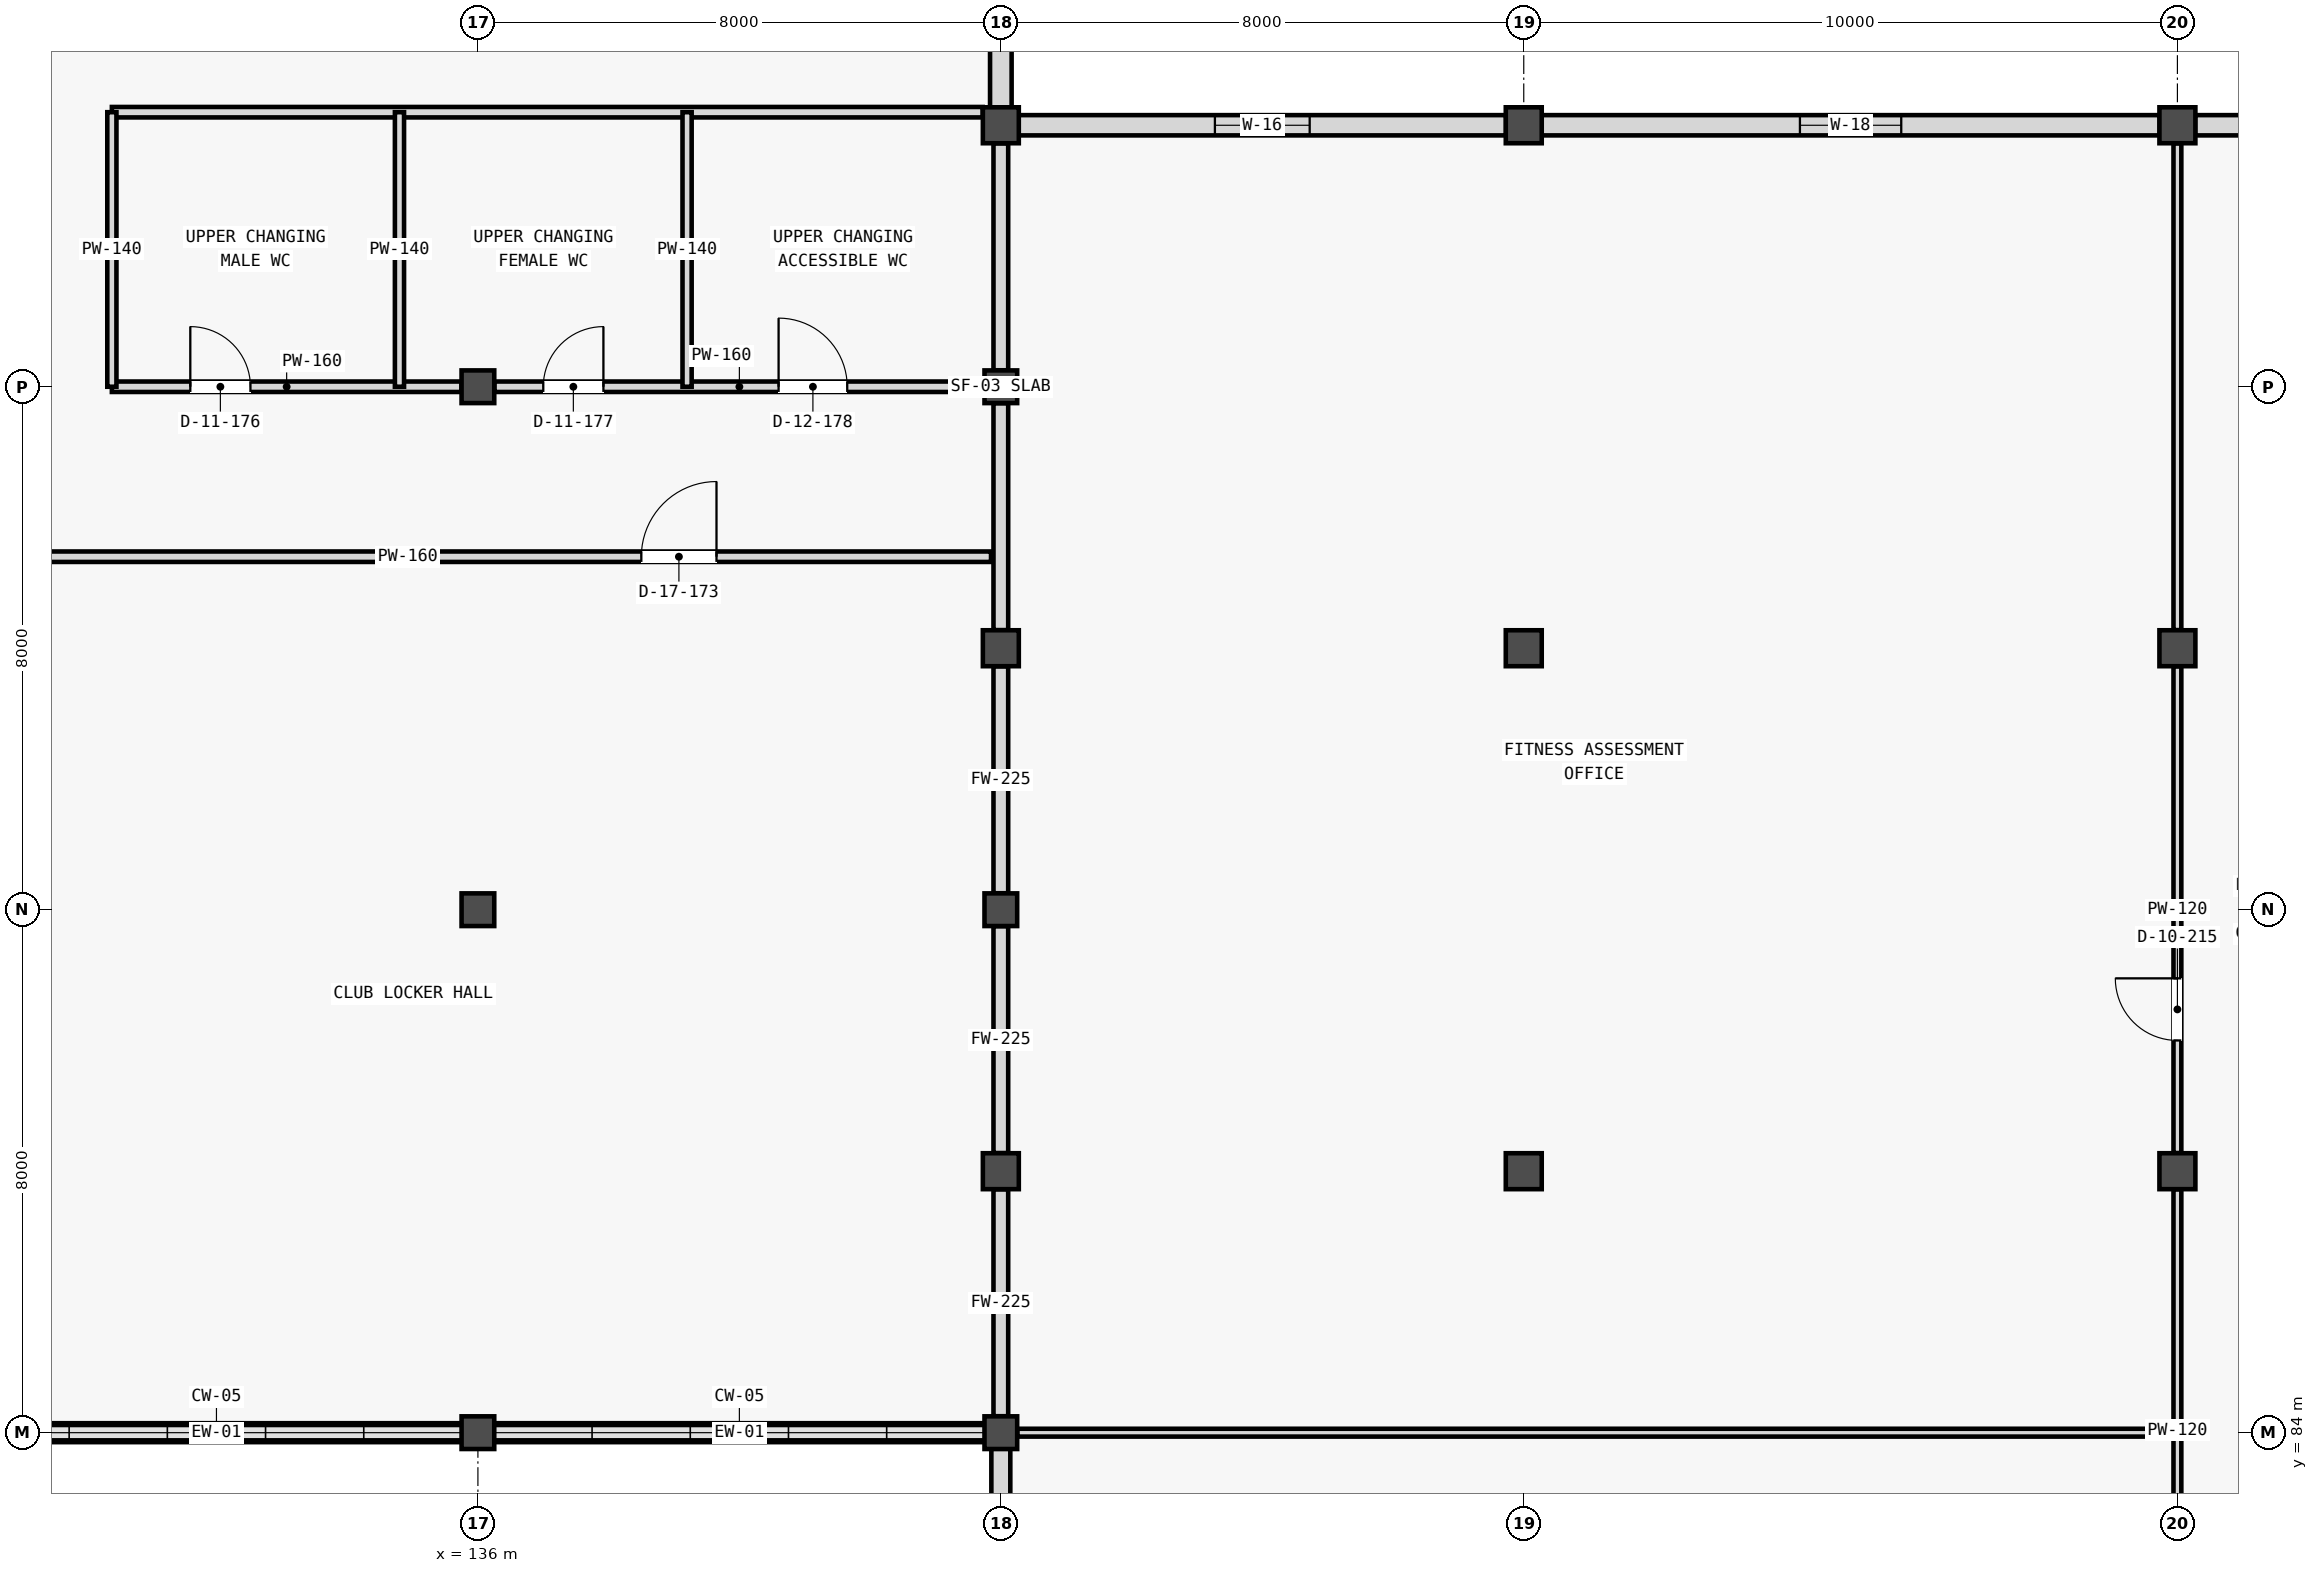
"""IFC4 building model, lengths in metres.
Left out: names, types, materials, properties, quantities, classifications, styles, units other than length and angle.
Written with IfcOpenShell. Run it as: python <this file> out.ifc"""

import sys

from ifc_helpers import new_model, si_unit, direction, frame, frame_2d, origin, origin_2d, place, context, subcontext, project, spatial, rectangle, extrude, element, fill, save


model = new_model("IFC4")
c1 = context("Model", 3, precision=1e-05, world=origin(), true_north=direction((0.0, 1.0)))
c2 = subcontext(c1, "Body", "Model", "MODEL_VIEW")
j1 = project(units=[si_unit("LENGTHUNIT", "METRE"), si_unit("PLANEANGLEUNIT", "RADIAN")], contexts=[c1])
p1 = place(None, origin())
s1 = spatial("IfcSite", under=j1, at=p1, CompositionType="ELEMENT")
p2 = place(p1, origin())
s2 = spatial("IfcBuilding", under=s1, at=p2, CompositionType="ELEMENT")
p3 = place(p2, frame((0.0, 0.0, 5.4)))
s3 = spatial("IfcBuildingStorey", under=s2, at=p3, CompositionType="ELEMENT", Elevation=5.4)
for number, where, z_axis, x_axis in (
    (1, (136.0, 84.0, 0.0), (0.0, 0.0, 1.0), (1.0, 0.0, 0.0)),
    (2, (136.0, 92.0, 0.0), (0.0, 0.0, 1.0), (1.0, 0.0, 0.0)),
    (3, (136.0, 100.0, 0.0), (0.0, 0.0, 1.0), (1.0, 0.0, 0.0)),
    (4, (144.0, 84.0, 0.0), (0.0, 0.0, 1.0), (1.0, 0.0, 0.0)),
    (5, (144.0, 92.0, 0.0), (0.0, 0.0, 1.0), (1.0, 0.0, 0.0)),
    (6, (144.0, 100.0, 0.0), (0.0, 0.0, 1.0), (1.0, 0.0, 0.0)),
):
    element("IfcColumn", number, at=place(p3, frame(where, z_axis=z_axis, x_axis=x_axis)), inside=s3, PredefinedType="COLUMN", context=c2, shape_type="SweptSolid", body=[
        extrude(rectangle(XDim=0.5, YDim=0.5, at=origin_2d()), origin(), (0.0, 0.0, 1.0), 4.57),
    ])
p4 = place(p3, frame((144.0, 88.0, 0.0), z_axis=(0.0, 0.0, 1.0), x_axis=(1.0, 0.0, 0.0)))
e7 = element("IfcColumn", 7, at=p4, inside=s3, PredefinedType="COLUMN", context=c2, shape_type="SweptSolid", body=[
    extrude(rectangle(XDim=0.55, YDim=0.55, at=origin_2d()), origin(), (0.0, 0.0, 1.0), 4.57),
])
for number, where, z_axis, x_axis in (
    (8, (152.0, 88.0, 0.0), (0.0, 0.0, 1.0), (1.0, 0.0, 0.0)),
    (9, (162.0, 88.0, 0.0), (0.0, 0.0, 1.0), (1.0, 0.0, 0.0)),
):
    element("IfcColumn", number, at=place(p3, frame(where, z_axis=z_axis, x_axis=x_axis)), inside=s3, PredefinedType="COLUMN", context=c2, shape_type="SweptSolid", body=[
        extrude(rectangle(XDim=0.55, YDim=0.55, at=origin_2d()), origin(), (0.0, 0.0, 1.0), 4.55),
    ])
p5 = place(p3, frame((144.0, 96.0, 0.0), z_axis=(0.0, 0.0, 1.0), x_axis=(1.0, 0.0, 0.0)))
e10 = element("IfcColumn", 10, at=p5, inside=s3, PredefinedType="COLUMN", context=c2, shape_type="SweptSolid", body=[
    extrude(rectangle(XDim=0.55, YDim=0.55, at=origin_2d()), origin(), (0.0, 0.0, 1.0), 4.57),
])
for number, where, z_axis, x_axis in (
    (11, (152.0, 96.0, 0.0), (0.0, 0.0, 1.0), (1.0, 0.0, 0.0)),
    (12, (162.0, 96.0, 0.0), (0.0, 0.0, 1.0), (1.0, 0.0, 0.0)),
):
    element("IfcColumn", number, at=place(p3, frame(where, z_axis=z_axis, x_axis=x_axis)), inside=s3, PredefinedType="COLUMN", context=c2, shape_type="SweptSolid", body=[
        extrude(rectangle(XDim=0.55, YDim=0.55, at=origin_2d()), origin(), (0.0, 0.0, 1.0), 4.55),
    ])
p6 = place(p3, frame((144.0, 104.0, 0.0), z_axis=(0.0, 0.0, 1.0), x_axis=(1.0, 0.0, 0.0)))
e13 = element("IfcColumn", 13, at=p6, inside=s3, PredefinedType="COLUMN", context=c2, shape_type="SweptSolid", body=[
    extrude(rectangle(XDim=0.55, YDim=0.55, at=origin_2d()), origin(), (0.0, 0.0, 1.0), 4.57),
])
for number, where, z_axis, x_axis in (
    (14, (152.0, 104.0, 0.0), (0.0, 0.0, 1.0), (1.0, 0.0, 0.0)),
    (15, (162.0, 104.0, 0.0), (0.0, 0.0, 1.0), (1.0, 0.0, 0.0)),
):
    element("IfcColumn", number, at=place(p3, frame(where, z_axis=z_axis, x_axis=x_axis)), inside=s3, PredefinedType="COLUMN", context=c2, shape_type="SweptSolid", body=[
        extrude(rectangle(XDim=0.55, YDim=0.55, at=origin_2d()), origin(), (0.0, 0.0, 1.0), 4.59),
    ])
for number, where, z_axis, x_axis in (
    (16, (128.246, 84.0, 0.0), (0.0, 0.0, 1.0), (1.0, 0.0, 0.0)),
    (17, (136.246, 84.0, 0.0), (0.0, 0.0, 1.0), (1.0, 0.0, 0.0)),
):
    element("IfcWall", number, at=place(p3, frame(where, z_axis=z_axis, x_axis=x_axis)), inside=s3, PredefinedType="STANDARD", context=c2, shape_type="SweptSolid", body=[
        extrude(rectangle(XDim=7.508, YDim=0.29, at=frame_2d((3.754, 0.0))), origin(), (0.0, 0.0, 1.0), 1.4),
    ])
p7 = place(p3, frame((144.0, 104.271, 0.0), z_axis=(0.0, 0.0, 1.0), x_axis=(0.0, 1.0, 0.0)))
e18 = element("IfcWall", 18, at=p7, inside=s3, PredefinedType="STANDARD", context=c2, shape_type="SweptSolid", body=[
    extrude(rectangle(XDim=3.483, YDim=0.33, at=frame_2d((1.741, 0.0))), origin(), (0.0, 0.0, 1.0), 3.85),
])
p8 = place(p3, frame((144.0, 80.271, 0.0), z_axis=(0.0, 0.0, 1.0), x_axis=(0.0, 1.0, 0.0)))
e19 = element("IfcWall", 19, at=p8, inside=s3, PredefinedType="STANDARD", context=c2, shape_type="SweptSolid", body=[
    extrude(rectangle(XDim=3.483, YDim=0.29, at=frame_2d((1.741, 0.0))), origin(), (0.0, 0.0, 1.0), 3.85),
])
p9 = place(p3, frame((144.271, 104.0, 0.0), z_axis=(0.0, 0.0, 1.0), x_axis=(1.0, 0.0, 0.0)))
e20 = element("IfcWall", 20, at=p9, inside=s3, PredefinedType="STANDARD", context=c2, shape_type="SweptSolid", body=[
    extrude(rectangle(XDim=7.458, YDim=0.31, at=frame_2d((3.729, 0.0))), origin(), (0.0, 0.0, 1.0), 3.65),
])
p10 = place(p9, frame((3.004, 0.0, 0.95)))
e21 = element("IfcOpeningElement", 21, at=p10, cuts=e20, PredefinedType="OPENING", context=c2, shape_type="SweptSolid", body=[
    extrude(rectangle(XDim=1.45, YDim=1.5, at=frame_2d((0.725, 0.75))), frame((0.0, 0.165, 0.0), z_axis=(0.0, -1.0, 0.0), x_axis=(1.0, 0.0, 0.0)), (0.0, 0.0, 1.0), 0.33),
])
p11 = place(p3, frame((152.271, 104.0, 0.0), z_axis=(0.0, 0.0, 1.0), x_axis=(1.0, 0.0, 0.0)))
e22 = element("IfcWall", 22, at=p11, inside=s3, PredefinedType="STANDARD", context=c2, shape_type="SweptSolid", body=[
    extrude(rectangle(XDim=9.458, YDim=0.31, at=frame_2d((4.729, 0.0))), origin(), (0.0, 0.0, 1.0), 3.65),
])
p12 = place(p11, frame((3.954, 0.0, 0.95)))
e23 = element("IfcOpeningElement", 23, at=p12, cuts=e22, PredefinedType="OPENING", context=c2, shape_type="SweptSolid", body=[
    extrude(rectangle(XDim=1.55, YDim=1.95, at=frame_2d((0.775, 0.975))), frame((0.0, 0.165, 0.0), z_axis=(0.0, -1.0, 0.0), x_axis=(1.0, 0.0, 0.0)), (0.0, 0.0, 1.0), 0.33),
])
p13 = place(p3, frame((162.271, 104.0, 0.0), z_axis=(0.0, 0.0, 1.0), x_axis=(1.0, 0.0, 0.0)))
e24 = element("IfcWall", 24, at=p13, inside=s3, PredefinedType="STANDARD", context=c2, shape_type="SweptSolid", body=[
    extrude(rectangle(XDim=5.749, YDim=0.31, at=frame_2d((2.875, 0.0))), origin(), (0.0, 0.0, 1.0), 3.65),
])
p14 = place(p13, frame((0.759, 0.0, 0.95)))
e25 = element("IfcOpeningElement", 25, at=p14, cuts=e24, PredefinedType="OPENING", context=c2, shape_type="SweptSolid", body=[
    extrude(rectangle(XDim=1.0, YDim=1.6, at=frame_2d((0.5, 0.8))), frame((0.0, 0.165, 0.0), z_axis=(0.0, -1.0, 0.0), x_axis=(1.0, 0.0, 0.0)), (0.0, 0.0, 1.0), 0.33),
])
for number, where, z_axis, x_axis in (
    (26, (144.0, 84.252, 0.0), (0.0, 0.0, 1.0), (0.0, 1.0, 0.0)),
    (27, (144.0, 88.277, 0.0), (0.0, 0.0, 1.0), (0.0, 1.0, 0.0)),
    (28, (144.0, 92.252, 0.0), (0.0, 0.0, 1.0), (0.0, 1.0, 0.0)),
    (29, (144.0, 96.277, 0.0), (0.0, 0.0, 1.0), (0.0, 1.0, 0.0)),
    (30, (144.0, 100.252, 0.0), (0.0, 0.0, 1.0), (0.0, 1.0, 0.0)),
):
    element("IfcWall", number, at=place(p3, frame(where, z_axis=z_axis, x_axis=x_axis)), inside=s3, PredefinedType="STANDARD", context=c2, shape_type="SweptSolid", body=[
        extrude(rectangle(XDim=3.471, YDim=0.225, at=frame_2d((1.735, 0.0))), origin(), (0.0, 0.0, 1.0), 3.98),
    ])
p15 = place(p3, frame((96.15, 97.4, 0.0), z_axis=(0.0, 0.0, 1.0), x_axis=(1.0, 0.0, 0.0)))
e31 = element("IfcWall", 31, at=p15, inside=s3, PredefinedType="PARTITIONING", context=c2, shape_type="SweptSolid", body=[
    extrude(rectangle(XDim=47.7, YDim=0.16, at=frame_2d((23.85, 0.0))), origin(), (0.0, 0.0, 1.0), 3.83),
])
p16 = place(p15, frame((4.35, 0.0, 0.0)))
e32 = element("IfcOpeningElement", 32, at=p16, cuts=e31, PredefinedType="OPENING", context=c2, shape_type="SweptSolid", body=[
    extrude(rectangle(XDim=1.1, YDim=2.15, at=frame_2d((0.55, 1.075))), frame((0.0, 0.09, 0.0), z_axis=(0.0, -1.0, 0.0), x_axis=(1.0, 0.0, 0.0)), (0.0, 0.0, 1.0), 0.18),
])
p17 = place(p15, frame((18.35, 0.0, 0.0)))
e33 = element("IfcOpeningElement", 33, at=p17, cuts=e31, PredefinedType="OPENING", context=c2, shape_type="SweptSolid", body=[
    extrude(rectangle(XDim=1.1, YDim=2.15, at=frame_2d((0.55, 1.075))), frame((0.0, 0.09, 0.0), z_axis=(0.0, -1.0, 0.0), x_axis=(1.0, 0.0, 0.0)), (0.0, 0.0, 1.0), 0.18),
])
p18 = place(p15, frame((29.35, 0.0, 0.0)))
e34 = element("IfcOpeningElement", 34, at=p18, cuts=e31, PredefinedType="OPENING", context=c2, shape_type="SweptSolid", body=[
    extrude(rectangle(XDim=1.15, YDim=2.15, at=frame_2d((0.575, 1.075))), frame((0.0, 0.09, 0.0), z_axis=(0.0, -1.0, 0.0), x_axis=(1.0, 0.0, 0.0)), (0.0, 0.0, 1.0), 0.18),
])
p19 = place(p15, frame((42.35, 0.0, 0.0)))
e35 = element("IfcOpeningElement", 35, at=p19, cuts=e31, PredefinedType="OPENING", context=c2, shape_type="SweptSolid", body=[
    extrude(rectangle(XDim=1.15, YDim=2.15, at=frame_2d((0.575, 1.075))), frame((0.0, 0.09, 0.0), z_axis=(0.0, -1.0, 0.0), x_axis=(1.0, 0.0, 0.0)), (0.0, 0.0, 1.0), 0.18),
])
p20 = place(p3, frame((130.4, 100.0, 0.0), z_axis=(0.0, 0.0, 1.0), x_axis=(1.0, 0.0, 0.0)))
e36 = element("IfcWall", 36, at=p20, inside=s3, PredefinedType="PARTITIONING", context=c2, shape_type="SweptSolid", body=[
    extrude(rectangle(XDim=5.348, YDim=0.16, at=frame_2d((2.674, 0.0))), origin(), (0.0, 0.0, 1.0), 3.78),
])
p21 = place(p20, frame((1.2, 0.0, 0.0)))
e37 = element("IfcOpeningElement", 37, at=p21, cuts=e36, PredefinedType="OPENING", context=c2, shape_type="SweptSolid", body=[
    extrude(rectangle(XDim=0.92, YDim=2.1, at=frame_2d((0.46, 1.05))), frame((0.0, 0.09, 0.0), z_axis=(0.0, -1.0, 0.0), x_axis=(1.0, 0.0, 0.0)), (0.0, 0.0, 1.0), 0.18),
])
p22 = place(p3, frame((136.252, 100.0, 0.0), z_axis=(0.0, 0.0, 1.0), x_axis=(1.0, 0.0, 0.0)))
e38 = element("IfcWall", 38, at=p22, inside=s3, PredefinedType="PARTITIONING", context=c2, shape_type="SweptSolid", body=[
    extrude(rectangle(XDim=7.496, YDim=0.16, at=frame_2d((3.748, 0.0))), origin(), (0.0, 0.0, 1.0), 3.78),
])
p23 = place(p22, frame((0.748, 0.0, 0.0)))
e39 = element("IfcOpeningElement", 39, at=p23, cuts=e38, PredefinedType="OPENING", context=c2, shape_type="SweptSolid", body=[
    extrude(rectangle(XDim=0.92, YDim=2.1, at=frame_2d((0.46, 1.05))), frame((0.0, 0.09, 0.0), z_axis=(0.0, -1.0, 0.0), x_axis=(1.0, 0.0, 0.0)), (0.0, 0.0, 1.0), 0.18),
])
p24 = place(p22, frame((4.348, 0.0, 0.0)))
e40 = element("IfcOpeningElement", 40, at=p24, cuts=e38, PredefinedType="OPENING", context=c2, shape_type="SweptSolid", body=[
    extrude(rectangle(XDim=1.05, YDim=2.15, at=frame_2d((0.525, 1.075))), frame((0.0, 0.09, 0.0), z_axis=(0.0, -1.0, 0.0), x_axis=(1.0, 0.0, 0.0)), (0.0, 0.0, 1.0), 0.18),
])
p25 = place(p3, frame((130.4, 104.2, 0.0), z_axis=(0.0, 0.0, 1.0), x_axis=(1.0, 0.0, 0.0)))
e41 = element("IfcWall", 41, at=p25, inside=s3, PredefinedType="PARTITIONING", context=c2, shape_type="SweptSolid", body=[
    extrude(rectangle(XDim=13.323, YDim=0.16, at=frame_2d((6.662, 0.0))), origin(), (0.0, 0.0, 1.0), 3.83),
])
for number, where, z_axis, x_axis in (
    (42, (130.4, 100.0, 0.0), (0.0, 0.0, 1.0), (0.0, 1.0, 0.0)),
    (43, (134.8, 100.0, 0.0), (0.0, 0.0, 1.0), (0.0, 1.0, 0.0)),
    (44, (139.2, 100.0, 0.0), (0.0, 0.0, 1.0), (0.0, 1.0, 0.0)),
):
    element("IfcWall", number, at=place(p3, frame(where, z_axis=z_axis, x_axis=x_axis)), inside=s3, PredefinedType="PLUMBINGWALL", context=c2, shape_type="SweptSolid", body=[
        extrude(rectangle(XDim=4.2, YDim=0.14, at=frame_2d((2.1, 0.0))), origin(), (0.0, 0.0, 1.0), 3.78),
    ])
p26 = place(p3, frame((162.0, 80.352, 0.0), z_axis=(0.0, 0.0, 1.0), x_axis=(0.0, 1.0, 0.0)))
e45 = element("IfcWall", 45, at=p26, inside=s3, PredefinedType="PARTITIONING", context=c2, shape_type="SweptSolid", body=[
    extrude(rectangle(XDim=7.371, YDim=0.12, at=frame_2d((3.686, 0.0))), origin(), (0.0, 0.0, 1.0), 3.83),
])
p27 = place(p3, frame((162.0, 88.277, 0.0), z_axis=(0.0, 0.0, 1.0), x_axis=(0.0, 1.0, 0.0)))
e46 = element("IfcWall", 46, at=p27, inside=s3, PredefinedType="PARTITIONING", context=c2, shape_type="SweptSolid", body=[
    extrude(rectangle(XDim=7.446, YDim=0.12, at=frame_2d((3.723, 0.0))), origin(), (0.0, 0.0, 1.0), 3.83),
])
p28 = place(p27, frame((1.723, 0.0, 0.0)))
e47 = element("IfcOpeningElement", 47, at=p28, cuts=e46, PredefinedType="OPENING", context=c2, shape_type="SweptSolid", body=[
    extrude(rectangle(XDim=0.95, YDim=2.15, at=frame_2d((0.475, 1.075))), frame((0.0, 0.07, 0.0), z_axis=(0.0, -1.0, 0.0), x_axis=(1.0, 0.0, 0.0)), (0.0, 0.0, 1.0), 0.14),
])
p29 = place(p3, frame((162.0, 96.277, 0.0), z_axis=(0.0, 0.0, 1.0), x_axis=(0.0, 1.0, 0.0)))
e48 = element("IfcWall", 48, at=p29, inside=s3, PredefinedType="PARTITIONING", context=c2, shape_type="SweptSolid", body=[
    extrude(rectangle(XDim=7.446, YDim=0.12, at=frame_2d((3.723, 0.0))), origin(), (0.0, 0.0, 1.0), 3.83),
])
p30 = place(p3, frame((144.252, 84.0, 0.0), z_axis=(0.0, 0.0, 1.0), x_axis=(1.0, 0.0, 0.0)))
e49 = element("IfcWall", 49, at=p30, inside=s3, PredefinedType="PARTITIONING", context=c2, shape_type="SweptSolid", body=[
    extrude(rectangle(XDim=17.748, YDim=0.12, at=frame_2d((8.874, 0.0))), origin(), (0.0, 0.0, 1.0), 3.83),
])
p31 = place(p10, origin())
e50 = element("IfcWindow", 50, at=p31, inside=s3, PartitioningType="SINGLE_PANEL", PredefinedType="WINDOW", context=c2, shape_type="SweptSolid", body=[
    extrude(rectangle(XDim=1.45, YDim=1.5, at=frame_2d((0.725, 0.75))), frame((0.0, 0.03, 0.0), z_axis=(0.0, -1.0, 0.0), x_axis=(1.0, 0.0, 0.0)), (0.0, 0.0, 1.0), 0.06),
])
fill(e21, e50)
p32 = place(p12, origin())
e51 = element("IfcWindow", 51, at=p32, inside=s3, PartitioningType="SINGLE_PANEL", PredefinedType="WINDOW", context=c2, shape_type="SweptSolid", body=[
    extrude(rectangle(XDim=1.55, YDim=1.95, at=frame_2d((0.775, 0.975))), frame((0.0, 0.03, 0.0), z_axis=(0.0, -1.0, 0.0), x_axis=(1.0, 0.0, 0.0)), (0.0, 0.0, 1.0), 0.06),
])
fill(e23, e51)
p33 = place(p19, origin())
e52 = element("IfcDoor", 52, at=p33, inside=s3, OperationType="SINGLE_SWING_RIGHT", PredefinedType="DOOR", context=c2, shape_type="SweptSolid", body=[
    extrude(rectangle(XDim=1.15, YDim=2.15, at=frame_2d((0.575, 1.075))), frame((0.0, 0.025, 0.0), z_axis=(0.0, -1.0, 0.0), x_axis=(1.0, 0.0, 0.0)), (0.0, 0.0, 1.0), 0.05),
])
fill(e35, e52)
p34 = place(p21, origin())
e53 = element("IfcDoor", 53, at=p34, inside=s3, OperationType="SINGLE_SWING_LEFT", PredefinedType="DOOR", context=c2, shape_type="SweptSolid", body=[
    extrude(rectangle(XDim=0.92, YDim=2.1, at=frame_2d((0.46, 1.05))), frame((0.0, 0.025, 0.0), z_axis=(0.0, -1.0, 0.0), x_axis=(1.0, 0.0, 0.0)), (0.0, 0.0, 1.0), 0.05),
])
fill(e37, e53)
p35 = place(p23, origin())
e54 = element("IfcDoor", 54, at=p35, inside=s3, OperationType="SINGLE_SWING_RIGHT", PredefinedType="DOOR", context=c2, shape_type="SweptSolid", body=[
    extrude(rectangle(XDim=0.92, YDim=2.1, at=frame_2d((0.46, 1.05))), frame((0.0, 0.025, 0.0), z_axis=(0.0, -1.0, 0.0), x_axis=(1.0, 0.0, 0.0)), (0.0, 0.0, 1.0), 0.05),
])
fill(e39, e54)
p36 = place(p24, origin())
e55 = element("IfcDoor", 55, at=p36, inside=s3, OperationType="SINGLE_SWING_LEFT", PredefinedType="DOOR", context=c2, shape_type="SweptSolid", body=[
    extrude(rectangle(XDim=1.05, YDim=2.15, at=frame_2d((0.525, 1.075))), frame((0.0, 0.025, 0.0), z_axis=(0.0, -1.0, 0.0), x_axis=(1.0, 0.0, 0.0)), (0.0, 0.0, 1.0), 0.05),
])
fill(e40, e55)
p37 = place(p28, origin())
e56 = element("IfcDoor", 56, at=p37, inside=s3, OperationType="SINGLE_SWING_RIGHT", PredefinedType="DOOR", context=c2, shape_type="SweptSolid", body=[
    extrude(rectangle(XDim=0.95, YDim=2.15, at=frame_2d((0.475, 1.075))), frame((0.0, 0.025, 0.0), z_axis=(0.0, -1.0, 0.0), x_axis=(1.0, 0.0, 0.0)), (0.0, 0.0, 1.0), 0.05),
])
fill(e47, e56)
save(model, sys.argv[1])
